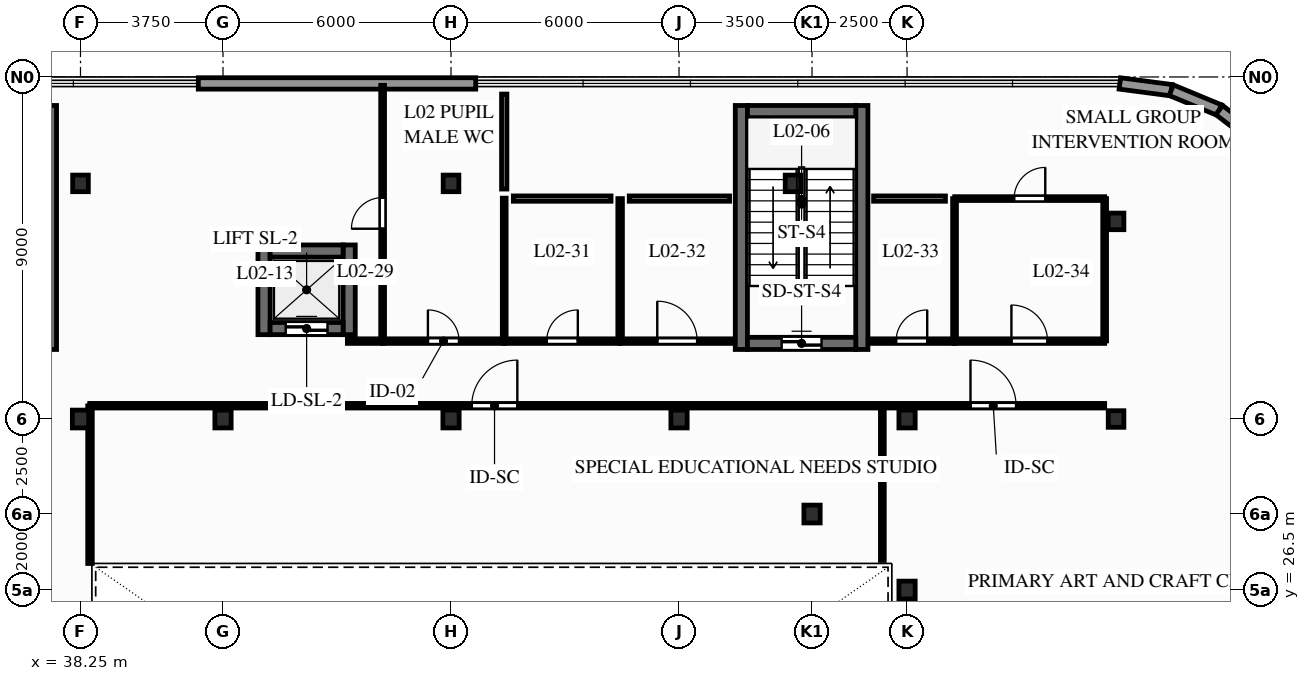
"""IFC4 building model, lengths in metres.
Left out: names, types, materials, properties, quantities, classifications, styles, units other than length and angle.
Written with IfcOpenShell. Run it as: python <this file> out.ifc"""

import sys

from ifc_helpers import new_model, si_unit, direction, frame, frame_2d, origin, origin_2d, place, context, subcontext, project, spatial, rectangle, i_section, extrude, element, fill, save


model = new_model("IFC4")
c1 = context("Model", 3, precision=1e-05, world=origin(), true_north=direction((0.0, 1.0)))
c2 = subcontext(c1, "Body", "Model", "MODEL_VIEW")
j1 = project(units=[si_unit("LENGTHUNIT", "METRE"), si_unit("PLANEANGLEUNIT", "RADIAN")], contexts=[c1])
p1 = place(None, origin())
s1 = spatial("IfcSite", under=j1, at=p1, CompositionType="ELEMENT")
p2 = place(p1, origin())
s2 = spatial("IfcBuilding", under=s1, at=p2, CompositionType="ELEMENT")
p3 = place(p2, frame((0.0, 0.0, 9.0)))
s3 = spatial("IfcBuildingStorey", under=s2, at=p3, CompositionType="ELEMENT", Elevation=9.0)
p4 = place(p3, frame((38.25, 31.0, 0.0), z_axis=(0.0, 0.0, 1.0), x_axis=(1.0, 0.0, 0.0)))
e1 = element("IfcColumn", 1, at=p4, inside=s3, PredefinedType="COLUMN", context=c2, shape_type="SweptSolid", body=[
    extrude(i_section(OverallWidth=0.428, OverallDepth=0.469, WebThickness=0.078, FlangeThickness=0.125, FilletRadius=0.015, at=origin_2d()), origin(), (0.0, 0.0, 1.0), 4.5),
])
p5 = place(p3, frame((38.25, 37.2, 0.0), z_axis=(0.0, 0.0, 1.0), x_axis=(1.0, 0.0, 0.0)))
e2 = element("IfcColumn", 2, at=p5, inside=s3, PredefinedType="COLUMN", context=c2, shape_type="SweptSolid", body=[
    extrude(i_section(OverallWidth=0.412, OverallDepth=0.437, WebThickness=0.036, FlangeThickness=0.058, FilletRadius=0.015, at=origin_2d()), origin(), (0.0, 0.0, 1.0), 4.5),
])
for number, where, z_axis, x_axis in (
    (3, (42.0, 31.0, 0.0), (0.0, 0.0, 1.0), (1.0, 0.0, 0.0)),
    (4, (48.0, 31.0, 0.0), (0.0, 0.0, 1.0), (1.0, 0.0, 0.0)),
):
    element("IfcColumn", number, at=place(p3, frame(where, z_axis=z_axis, x_axis=x_axis)), inside=s3, PredefinedType="COLUMN", context=c2, shape_type="SweptSolid", body=[
        extrude(i_section(OverallWidth=0.428, OverallDepth=0.469, WebThickness=0.078, FlangeThickness=0.125, FilletRadius=0.015, at=origin_2d()), origin(), (0.0, 0.0, 1.0), 4.5),
    ])
p6 = place(p3, frame((48.0, 37.2, 0.0), z_axis=(0.0, 0.0, 1.0), x_axis=(1.0, 0.0, 0.0)))
e5 = element("IfcColumn", 5, at=p6, inside=s3, PredefinedType="COLUMN", context=c2, shape_type="SweptSolid", body=[
    extrude(i_section(OverallWidth=0.412, OverallDepth=0.437, WebThickness=0.036, FlangeThickness=0.058, FilletRadius=0.015, at=origin_2d()), origin(), (0.0, 0.0, 1.0), 4.5),
])
p7 = place(p3, frame((54.0, 31.0, 0.0), z_axis=(0.0, 0.0, 1.0), x_axis=(1.0, 0.0, 0.0)))
e6 = element("IfcColumn", 6, at=p7, inside=s3, PredefinedType="COLUMN", context=c2, shape_type="SweptSolid", body=[
    extrude(i_section(OverallWidth=0.428, OverallDepth=0.469, WebThickness=0.078, FlangeThickness=0.125, FilletRadius=0.015, at=origin_2d()), origin(), (0.0, 0.0, 1.0), 4.5),
])
p8 = place(p3, frame((57.0, 37.2, 0.0), z_axis=(0.0, 0.0, 1.0), x_axis=(1.0, 0.0, 0.0)))
e7 = element("IfcColumn", 7, at=p8, inside=s3, PredefinedType="COLUMN", context=c2, shape_type="SweptSolid", body=[
    extrude(i_section(OverallWidth=0.412, OverallDepth=0.437, WebThickness=0.036, FlangeThickness=0.058, FilletRadius=0.015, at=origin_2d()), origin(), (0.0, 0.0, 1.0), 4.5),
])
for number, where, z_axis, x_axis in (
    (8, (57.5, 28.5, 0.0), (0.0, 0.0, 1.0), (1.0, 0.0, 0.0)),
    (9, (60.0, 26.5, 0.0), (0.0, 0.0, 1.0), (1.0, 0.0, 0.0)),
    (10, (60.0, 31.0, 0.0), (0.0, 0.0, 1.0), (1.0, 0.0, 0.0)),
):
    element("IfcColumn", number, at=place(p3, frame(where, z_axis=z_axis, x_axis=x_axis)), inside=s3, PredefinedType="COLUMN", context=c2, shape_type="SweptSolid", body=[
        extrude(i_section(OverallWidth=0.428, OverallDepth=0.469, WebThickness=0.078, FlangeThickness=0.125, FilletRadius=0.015, at=origin_2d()), origin(), (0.0, 0.0, 1.0), 4.5),
    ])
for number, where, z_axis, x_axis in (
    (11, (65.5, 31.0, 0.0), (0.0, 0.0, 1.0), (1.0, 0.0, 0.0)),
    (12, (65.5, 36.2, 0.0), (0.0, 0.0, 1.0), (1.0, 0.0, 0.0)),
):
    element("IfcColumn", number, at=place(p3, frame(where, z_axis=z_axis, x_axis=x_axis)), inside=s3, PredefinedType="COLUMN", context=c2, shape_type="SweptSolid", body=[
        extrude(i_section(OverallWidth=0.412, OverallDepth=0.437, WebThickness=0.036, FlangeThickness=0.058, FilletRadius=0.015, at=origin_2d()), origin(), (0.0, 0.0, 1.0), 4.5),
    ])
p9 = place(p3, frame((65.6, 39.83, 0.0), z_axis=(0.0, 0.0, 1.0), x_axis=(0.991442117533, -0.13054703207, 0.0)))
e13 = element("IfcWall", 13, at=p9, inside=s3, PredefinedType="STANDARD", context=c2, shape_type="SweptSolid", body=[
    extrude(rectangle(XDim=1.365, YDim=0.3, at=frame_2d((0.683, 0.0))), origin(), (0.0, 0.0, 1.0), 4.22),
])
p10 = place(p3, frame((66.954, 39.652, 0.0), z_axis=(0.0, 0.0, 1.0), x_axis=(0.923894797396, -0.382646577594, 0.0)))
e14 = element("IfcWall", 14, at=p10, inside=s3, PredefinedType="STANDARD", context=c2, shape_type="SweptSolid", body=[
    extrude(rectangle(XDim=1.365, YDim=0.3, at=frame_2d((0.683, 0.0))), origin(), (0.0, 0.0, 1.0), 4.22),
])
p11 = place(p3, frame((68.215, 39.129, 0.0), z_axis=(0.0, 0.0, 1.0), x_axis=(0.793255091989, -0.6088894473, 0.0)))
e15 = element("IfcWall", 15, at=p11, inside=s3, PredefinedType="STANDARD", context=c2, shape_type="SweptSolid", body=[
    extrude(rectangle(XDim=1.365, YDim=0.3, at=frame_2d((0.683, 0.0))), origin(), (0.0, 0.0, 1.0), 4.22),
])
p12 = place(p3, frame((41.35, 39.83, 0.0), z_axis=(0.0, 0.0, 1.0), x_axis=(1.0, 0.0, 0.0)))
e16 = element("IfcWall", 16, at=p12, inside=s3, PredefinedType="STANDARD", context=c2, shape_type="SweptSolid", body=[
    extrude(rectangle(XDim=7.3, YDim=0.3, at=frame_2d((3.65, 0.0))), origin(), (0.0, 0.0, 1.0), 4.22),
])
for number, where, z_axis, x_axis in (
    (17, (37.46, 32.83, 0.0), (0.0, 0.0, 1.0), (0.0, 1.0, 0.0)),
    (18, (55.64, 32.83, 0.0), (0.0, 0.0, 1.0), (0.0, 1.0, 0.0)),
    (19, (58.81, 32.83, 0.0), (0.0, 0.0, 1.0), (0.0, 1.0, 0.0)),
):
    element("IfcWall", number, at=place(p3, frame(where, z_axis=z_axis, x_axis=x_axis)), inside=s3, PredefinedType="SHEAR", context=c2, shape_type="SweptSolid", body=[
        extrude(rectangle(XDim=6.42, YDim=0.32, at=frame_2d((3.21, 0.0))), origin(), (0.0, 0.0, 1.0), 4.22),
    ])
p13 = place(p3, frame((55.8, 32.99, 0.0), z_axis=(0.0, 0.0, 1.0), x_axis=(1.0, 0.0, 0.0)))
e20 = element("IfcWall", 20, at=p13, inside=s3, PredefinedType="SHEAR", context=c2, shape_type="SweptSolid", body=[
    extrude(rectangle(XDim=2.85, YDim=0.32, at=frame_2d((1.425, 0.0))), origin(), (0.0, 0.0, 1.0), 4.22),
])
p14 = place(p13, frame((0.9, 0.0, 0.0)))
e21 = element("IfcOpeningElement", 21, at=p14, cuts=e20, PredefinedType="OPENING", context=c2, shape_type="SweptSolid", body=[
    extrude(rectangle(XDim=1.05, YDim=2.06, at=frame_2d((0.525, 1.03))), frame((0.0, 0.17, 0.0), z_axis=(0.0, -1.0, 0.0), x_axis=(1.0, 0.0, 0.0)), (0.0, 0.0, 1.0), 0.34),
])
p15 = place(p3, frame((58.65, 39.09, 0.0), z_axis=(0.0, 0.0, 1.0), x_axis=(-1.0, 0.0, 0.0)))
e22 = element("IfcWall", 22, at=p15, inside=s3, PredefinedType="SHEAR", context=c2, shape_type="SweptSolid", body=[
    extrude(rectangle(XDim=2.85, YDim=0.32, at=frame_2d((1.425, 0.0))), origin(), (0.0, 0.0, 1.0), 4.22),
])
for number, where, z_axis, x_axis in (
    (23, (43.08, 33.22, 0.0), (0.0, 0.0, 1.0), (0.0, 1.0, 0.0)),
    (24, (45.32, 33.22, 0.0), (0.0, 0.0, 1.0), (0.0, 1.0, 0.0)),
):
    element("IfcWall", number, at=place(p3, frame(where, z_axis=z_axis, x_axis=x_axis)), inside=s3, PredefinedType="SHEAR", context=c2, shape_type="SweptSolid", body=[
        extrude(rectangle(XDim=2.36, YDim=0.32, at=frame_2d((1.18, 0.0))), origin(), (0.0, 0.0, 1.0), 4.22),
    ])
p16 = place(p3, frame((43.24, 33.38, 0.0), z_axis=(0.0, 0.0, 1.0), x_axis=(1.0, 0.0, 0.0)))
e25 = element("IfcWall", 25, at=p16, inside=s3, PredefinedType="SHEAR", context=c2, shape_type="SweptSolid", body=[
    extrude(rectangle(XDim=1.92, YDim=0.32, at=frame_2d((0.96, 0.0))), origin(), (0.0, 0.0, 1.0), 4.22),
])
p17 = place(p16, frame((0.41, 0.0, 0.0)))
e26 = element("IfcOpeningElement", 26, at=p17, cuts=e25, PredefinedType="OPENING", context=c2, shape_type="SweptSolid", body=[
    extrude(rectangle(XDim=1.1, YDim=2.06, at=frame_2d((0.55, 1.03))), frame((0.0, 0.17, 0.0), z_axis=(0.0, -1.0, 0.0), x_axis=(1.0, 0.0, 0.0)), (0.0, 0.0, 1.0), 0.34),
])
p18 = place(p3, frame((43.24, 35.42, 0.0), z_axis=(0.0, 0.0, 1.0), x_axis=(1.0, 0.0, 0.0)))
e27 = element("IfcWall", 27, at=p18, inside=s3, PredefinedType="SHEAR", context=c2, shape_type="SweptSolid", body=[
    extrude(rectangle(XDim=1.92, YDim=0.32, at=frame_2d((0.96, 0.0))), origin(), (0.0, 0.0, 1.0), 4.22),
])
p19 = place(p3, frame((45.273, 33.05, 0.0), z_axis=(0.0, 0.0, 1.0), x_axis=(1.0, 0.0, 0.0)))
e28 = element("IfcWall", 28, at=p19, inside=s3, PredefinedType="PARTITIONING", context=c2, shape_type="SweptSolid", body=[
    extrude(rectangle(XDim=0.938, YDim=0.12, at=frame_2d((0.469, 0.0))), origin(), (0.0, 0.0, 1.0), 4.22),
])
p20 = place(p3, frame((46.193, 33.05, 0.0), z_axis=(0.0, 0.0, 1.0), x_axis=(1.0, 0.0, 0.0)))
e29 = element("IfcWall", 29, at=p20, inside=s3, PredefinedType="PARTITIONING", context=c2, shape_type="SweptSolid", body=[
    extrude(rectangle(XDim=3.219, YDim=0.12, at=frame_2d((1.609, 0.0))), origin(), (0.0, 0.0, 1.0), 3.344),
])
p21 = place(p20, frame((1.199, 0.0, 0.0)))
e30 = element("IfcOpeningElement", 30, at=p21, cuts=e29, PredefinedType="OPENING", context=c2, shape_type="SweptSolid", body=[
    extrude(rectangle(XDim=0.82, YDim=2.02, at=frame_2d((0.41, 1.01))), frame((0.0, 0.07, 0.0), z_axis=(0.0, -1.0, 0.0), x_axis=(1.0, 0.0, 0.0)), (0.0, 0.0, 1.0), 0.14),
])
p22 = place(p3, frame((49.393, 33.05, 0.0), z_axis=(0.0, 0.0, 1.0), x_axis=(1.0, 0.0, 0.0)))
e31 = element("IfcWall", 31, at=p22, inside=s3, PredefinedType="PARTITIONING", context=c2, shape_type="SweptSolid", body=[
    extrude(rectangle(XDim=3.069, YDim=0.12, at=frame_2d((1.534, 0.0))), origin(), (0.0, 0.0, 1.0), 4.22),
])
p23 = place(p22, frame((1.124, 0.0, 0.0)))
e32 = element("IfcOpeningElement", 32, at=p23, cuts=e31, PredefinedType="OPENING", context=c2, shape_type="SweptSolid", body=[
    extrude(rectangle(XDim=0.82, YDim=2.02, at=frame_2d((0.41, 1.01))), frame((0.0, 0.07, 0.0), z_axis=(0.0, -1.0, 0.0), x_axis=(1.0, 0.0, 0.0)), (0.0, 0.0, 1.0), 0.14),
])
p24 = place(p3, frame((52.443, 33.05, 0.0), z_axis=(0.0, 0.0, 1.0), x_axis=(1.0, 0.0, 0.0)))
e33 = element("IfcWall", 33, at=p24, inside=s3, PredefinedType="PARTITIONING", context=c2, shape_type="SweptSolid", body=[
    extrude(rectangle(XDim=3.019, YDim=0.12, at=frame_2d((1.509, 0.0))), origin(), (0.0, 0.0, 1.0), 4.22),
])
p25 = place(p24, frame((0.984, 0.0, 0.0)))
e34 = element("IfcOpeningElement", 34, at=p25, cuts=e33, PredefinedType="OPENING", context=c2, shape_type="SweptSolid", body=[
    extrude(rectangle(XDim=1.05, YDim=2.06, at=frame_2d((0.525, 1.03))), frame((0.0, 0.07, 0.0), z_axis=(0.0, -1.0, 0.0), x_axis=(1.0, 0.0, 0.0)), (0.0, 0.0, 1.0), 0.14),
])
p26 = place(p3, frame((58.98, 33.05, 0.0), z_axis=(0.0, 0.0, 1.0), x_axis=(1.0, 0.0, 0.0)))
e35 = element("IfcWall", 35, at=p26, inside=s3, PredefinedType="PARTITIONING", context=c2, shape_type="SweptSolid", body=[
    extrude(rectangle(XDim=2.281, YDim=0.12, at=frame_2d((1.141, 0.0))), origin(), (0.0, 0.0, 1.0), 4.22),
])
p27 = place(p26, frame((0.731, 0.0, 0.0)))
e36 = element("IfcOpeningElement", 36, at=p27, cuts=e35, PredefinedType="OPENING", context=c2, shape_type="SweptSolid", body=[
    extrude(rectangle(XDim=0.82, YDim=2.02, at=frame_2d((0.41, 1.01))), frame((0.0, 0.07, 0.0), z_axis=(0.0, -1.0, 0.0), x_axis=(1.0, 0.0, 0.0)), (0.0, 0.0, 1.0), 0.14),
])
p28 = place(p3, frame((61.243, 33.05, 0.0), z_axis=(0.0, 0.0, 1.0), x_axis=(1.0, 0.0, 0.0)))
e37 = element("IfcWall", 37, at=p28, inside=s3, PredefinedType="PARTITIONING", context=c2, shape_type="SweptSolid", body=[
    extrude(rectangle(XDim=3.957, YDim=0.12, at=frame_2d((1.979, 0.0))), origin(), (0.0, 0.0, 1.0), 4.22),
])
p29 = place(p28, frame((1.504, 0.0, 0.0)))
e38 = element("IfcOpeningElement", 38, at=p29, cuts=e37, PredefinedType="OPENING", context=c2, shape_type="SweptSolid", body=[
    extrude(rectangle(XDim=0.95, YDim=2.05, at=frame_2d((0.475, 1.025))), frame((0.0, 0.07, 0.0), z_axis=(0.0, -1.0, 0.0), x_axis=(1.0, 0.0, 0.0)), (0.0, 0.0, 1.0), 0.14),
])
p30 = place(p3, frame((59.339, 31.35, 0.0), z_axis=(0.0, 0.0, 1.0), x_axis=(1.0, 0.0, 0.0)))
e39 = element("IfcWall", 39, at=p30, inside=s3, PredefinedType="PARTITIONING", context=c2, shape_type="SweptSolid", body=[
    extrude(rectangle(XDim=5.861, YDim=0.12, at=frame_2d((2.931, 0.0))), origin(), (0.0, 0.0, 1.0), 4.22),
])
p31 = place(p30, frame((2.331, 0.0, 0.0)))
e40 = element("IfcOpeningElement", 40, at=p31, cuts=e39, PredefinedType="OPENING", context=c2, shape_type="SweptSolid", body=[
    extrude(rectangle(XDim=1.2, YDim=2.08, at=frame_2d((0.6, 1.04))), frame((0.0, 0.07, 0.0), z_axis=(0.0, -1.0, 0.0), x_axis=(1.0, 0.0, 0.0)), (0.0, 0.0, 1.0), 0.14),
])
p32 = place(p3, frame((38.493, 31.35, 0.0), z_axis=(0.0, 0.0, 1.0), x_axis=(1.0, 0.0, 0.0)))
e41 = element("IfcWall", 41, at=p32, inside=s3, PredefinedType="PARTITIONING", context=c2, shape_type="SweptSolid", body=[
    extrude(rectangle(XDim=20.865, YDim=0.12, at=frame_2d((10.432, 0.0))), origin(), (0.0, 0.0, 1.0), 3.344),
])
p33 = place(p32, frame((10.052, 0.0, 0.0)))
e42 = element("IfcOpeningElement", 42, at=p33, cuts=e41, PredefinedType="OPENING", context=c2, shape_type="SweptSolid", body=[
    extrude(rectangle(XDim=1.2, YDim=2.08, at=frame_2d((0.6, 1.04))), frame((0.0, 0.07, 0.0), z_axis=(0.0, -1.0, 0.0), x_axis=(1.0, 0.0, 0.0)), (0.0, 0.0, 1.0), 0.14),
])
p34 = place(p3, frame((38.5, 27.199, 0.0), z_axis=(0.0, 0.0, 1.0), x_axis=(0.0, 1.0, 0.0)))
e43 = element("IfcWall", 43, at=p34, inside=s3, PredefinedType="PARTITIONING", context=c2, shape_type="SweptSolid", body=[
    extrude(rectangle(XDim=4.146, YDim=0.12, at=frame_2d((2.073, 0.0))), origin(), (0.0, 0.0, 1.0), 3.344),
])
p35 = place(p3, frame((46.2, 33.054, 0.0), z_axis=(0.0, 0.0, 1.0), x_axis=(0.0, 1.0, 0.0)))
e44 = element("IfcWall", 44, at=p35, inside=s3, PredefinedType="PARTITIONING", context=c2, shape_type="SweptSolid", body=[
    extrude(rectangle(XDim=6.726, YDim=0.1, at=frame_2d((3.363, 0.0))), origin(), (0.0, 0.0, 1.0), 3.583),
])
p36 = place(p35, frame((2.953, 0.0, 0.0)))
e45 = element("IfcOpeningElement", 45, at=p36, cuts=e44, PredefinedType="OPENING", context=c2, shape_type="SweptSolid", body=[
    extrude(rectangle(XDim=0.82, YDim=2.02, at=frame_2d((0.41, 1.01))), frame((0.0, 0.06, 0.0), z_axis=(0.0, -1.0, 0.0), x_axis=(1.0, 0.0, 0.0)), (0.0, 0.0, 1.0), 0.12),
])
p37 = place(p3, frame((49.4, 33.054, 0.0), z_axis=(0.0, 0.0, 1.0), x_axis=(0.0, 1.0, 0.0)))
e46 = element("IfcWall", 46, at=p37, inside=s3, PredefinedType="PARTITIONING", context=c2, shape_type="SweptSolid", body=[
    extrude(rectangle(XDim=3.757, YDim=0.1, at=frame_2d((1.879, 0.0))), origin(), (0.0, 0.0, 1.0), 4.22),
])
p38 = place(p3, frame((52.45, 33.054, 0.0), z_axis=(0.0, 0.0, 1.0), x_axis=(0.0, 1.0, 0.0)))
e47 = element("IfcWall", 47, at=p38, inside=s3, PredefinedType="PARTITIONING", context=c2, shape_type="SweptSolid", body=[
    extrude(rectangle(XDim=3.746, YDim=0.12, at=frame_2d((1.873, 0.0))), origin(), (0.0, 0.0, 1.0), 4.22),
])
for number, where, z_axis, x_axis in (
    (48, (61.25, 33.054, 0.0), (0.0, 0.0, 1.0), (0.0, 1.0, 0.0)),
    (49, (65.2, 33.054, 0.0), (0.0, 0.0, 1.0), (0.0, 1.0, 0.0)),
):
    element("IfcWall", number, at=place(p3, frame(where, z_axis=z_axis, x_axis=x_axis)), inside=s3, PredefinedType="PARTITIONING", context=c2, shape_type="SweptSolid", body=[
        extrude(rectangle(XDim=3.746, YDim=0.1, at=frame_2d((1.873, 0.0))), origin(), (0.0, 0.0, 1.0), 4.22),
    ])
p39 = place(p3, frame((61.254, 36.8, 0.0), z_axis=(0.0, 0.0, 1.0), x_axis=(1.0, 0.0, 0.0)))
e50 = element("IfcWall", 50, at=p39, inside=s3, PredefinedType="PARTITIONING", context=c2, shape_type="SweptSolid", body=[
    extrude(rectangle(XDim=3.946, YDim=0.1, at=frame_2d((1.973, 0.0))), origin(), (0.0, 0.0, 1.0), 4.22),
])
p40 = place(p39, frame((1.563, 0.0, 0.0)))
e51 = element("IfcOpeningElement", 51, at=p40, cuts=e50, PredefinedType="OPENING", context=c2, shape_type="SweptSolid", body=[
    extrude(rectangle(XDim=0.82, YDim=2.02, at=frame_2d((0.41, 1.01))), frame((0.0, 0.06, 0.0), z_axis=(0.0, -1.0, 0.0), x_axis=(1.0, 0.0, 0.0)), (0.0, 0.0, 1.0), 0.12),
])
p41 = place(p3, frame((59.35, 27.28, 0.0), z_axis=(0.0, 0.0, 1.0), x_axis=(0.0, 1.0, 0.0)))
e52 = element("IfcWall", 52, at=p41, inside=s3, PredefinedType="PARTITIONING", context=c2, shape_type="SweptSolid", body=[
    extrude(rectangle(XDim=4.066, YDim=0.1, at=frame_2d((2.033, 0.0))), origin(), (0.0, 0.0, 1.0), 3.583),
])
p42 = place(p3, frame((49.4, 37.051, 0.0), z_axis=(0.0, 0.0, 1.0), x_axis=(0.0, 1.0, 0.0)))
e53 = element("IfcWall", 53, at=p42, inside=s3, PredefinedType="PARTITIONING", context=c2, shape_type="SweptSolid", body=[
    extrude(rectangle(XDim=2.499, YDim=0.14, at=frame_2d((1.25, 0.0))), origin(), (0.0, 0.0, 1.0), 4.22),
])
p43 = place(p3, frame((49.64, 36.8, 0.0), z_axis=(0.0, 0.0, 1.0), x_axis=(1.0, 0.0, 0.0)))
e54 = element("IfcWall", 54, at=p43, inside=s3, PredefinedType="PARTITIONING", context=c2, shape_type="SweptSolid", body=[
    extrude(rectangle(XDim=2.57, YDim=0.14, at=frame_2d((1.285, 0.0))), origin(), (0.0, 0.0, 1.0), 4.22),
])
p44 = place(p3, frame((52.69, 36.8, 0.0), z_axis=(0.0, 0.0, 1.0), x_axis=(1.0, 0.0, 0.0)))
e55 = element("IfcWall", 55, at=p44, inside=s3, PredefinedType="PARTITIONING", context=c2, shape_type="SweptSolid", body=[
    extrude(rectangle(XDim=2.64, YDim=0.14, at=frame_2d((1.32, 0.0))), origin(), (0.0, 0.0, 1.0), 4.22),
])
p45 = place(p3, frame((59.12, 36.8, 0.0), z_axis=(0.0, 0.0, 1.0), x_axis=(1.0, 0.0, 0.0)))
e56 = element("IfcWall", 56, at=p45, inside=s3, PredefinedType="PARTITIONING", context=c2, shape_type="SweptSolid", body=[
    extrude(rectangle(XDim=1.89, YDim=0.14, at=frame_2d((0.945, 0.0))), origin(), (0.0, 0.0, 1.0), 4.22),
])
p46 = place(p14, origin())
e57 = element("IfcDoor", 57, at=p46, inside=s3, OperationType="SINGLE_SWING_LEFT", PredefinedType="DOOR", context=c2, shape_type="SweptSolid", body=[
    extrude(rectangle(XDim=1.05, YDim=2.06, at=frame_2d((0.525, 1.03))), frame((0.0, 0.025, 0.0), z_axis=(0.0, -1.0, 0.0), x_axis=(1.0, 0.0, 0.0)), (0.0, 0.0, 1.0), 0.05),
])
fill(e21, e57)
p47 = place(p17, origin())
e58 = element("IfcDoor", 58, at=p47, inside=s3, OperationType="SLIDING_TO_LEFT", PredefinedType="DOOR", context=c2, shape_type="SweptSolid", body=[
    extrude(rectangle(XDim=1.1, YDim=2.06, at=frame_2d((0.55, 1.03))), frame((0.0, 0.025, 0.0), z_axis=(0.0, -1.0, 0.0), x_axis=(1.0, 0.0, 0.0)), (0.0, 0.0, 1.0), 0.05),
])
fill(e26, e58)
p48 = place(p21, origin())
e59 = element("IfcDoor", 59, at=p48, inside=s3, OperationType="SINGLE_SWING_LEFT", PredefinedType="DOOR", context=c2, shape_type="SweptSolid", body=[
    extrude(rectangle(XDim=0.82, YDim=2.02, at=frame_2d((0.41, 1.01))), frame((0.0, 0.025, 0.0), z_axis=(0.0, -1.0, 0.0), x_axis=(1.0, 0.0, 0.0)), (0.0, 0.0, 1.0), 0.05),
])
fill(e30, e59)
p49 = place(p23, origin())
e60 = element("IfcDoor", 60, at=p49, inside=s3, OperationType="SINGLE_SWING_RIGHT", PredefinedType="DOOR", context=c2, shape_type="SweptSolid", body=[
    extrude(rectangle(XDim=0.82, YDim=2.02, at=frame_2d((0.41, 1.01))), frame((0.0, 0.025, 0.0), z_axis=(0.0, -1.0, 0.0), x_axis=(1.0, 0.0, 0.0)), (0.0, 0.0, 1.0), 0.05),
])
fill(e32, e60)
p50 = place(p25, origin())
e61 = element("IfcDoor", 61, at=p50, inside=s3, OperationType="SINGLE_SWING_LEFT", PredefinedType="DOOR", context=c2, shape_type="SweptSolid", body=[
    extrude(rectangle(XDim=1.05, YDim=2.06, at=frame_2d((0.525, 1.03))), frame((0.0, 0.025, 0.0), z_axis=(0.0, -1.0, 0.0), x_axis=(1.0, 0.0, 0.0)), (0.0, 0.0, 1.0), 0.05),
])
fill(e34, e61)
p51 = place(p27, origin())
e62 = element("IfcDoor", 62, at=p51, inside=s3, OperationType="SINGLE_SWING_RIGHT", PredefinedType="DOOR", context=c2, shape_type="SweptSolid", body=[
    extrude(rectangle(XDim=0.82, YDim=2.02, at=frame_2d((0.41, 1.01))), frame((0.0, 0.025, 0.0), z_axis=(0.0, -1.0, 0.0), x_axis=(1.0, 0.0, 0.0)), (0.0, 0.0, 1.0), 0.05),
])
fill(e36, e62)
p52 = place(p29, origin())
e63 = element("IfcDoor", 63, at=p52, inside=s3, OperationType="SINGLE_SWING_LEFT", PredefinedType="DOOR", context=c2, shape_type="SweptSolid", body=[
    extrude(rectangle(XDim=0.95, YDim=2.05, at=frame_2d((0.475, 1.025))), frame((0.0, 0.025, 0.0), z_axis=(0.0, -1.0, 0.0), x_axis=(1.0, 0.0, 0.0)), (0.0, 0.0, 1.0), 0.05),
])
fill(e38, e63)
p53 = place(p31, origin())
e64 = element("IfcDoor", 64, at=p53, inside=s3, OperationType="SINGLE_SWING_LEFT", PredefinedType="DOOR", context=c2, shape_type="SweptSolid", body=[
    extrude(rectangle(XDim=1.2, YDim=2.08, at=frame_2d((0.6, 1.04))), frame((0.0, 0.025, 0.0), z_axis=(0.0, -1.0, 0.0), x_axis=(1.0, 0.0, 0.0)), (0.0, 0.0, 1.0), 0.05),
])
fill(e40, e64)
p54 = place(p33, origin())
e65 = element("IfcDoor", 65, at=p54, inside=s3, OperationType="SINGLE_SWING_RIGHT", PredefinedType="DOOR", context=c2, shape_type="SweptSolid", body=[
    extrude(rectangle(XDim=1.2, YDim=2.08, at=frame_2d((0.6, 1.04))), frame((0.0, 0.025, 0.0), z_axis=(0.0, -1.0, 0.0), x_axis=(1.0, 0.0, 0.0)), (0.0, 0.0, 1.0), 0.05),
])
fill(e42, e65)
p55 = place(p36, origin())
e66 = element("IfcDoor", 66, at=p55, inside=s3, OperationType="SINGLE_SWING_LEFT", PredefinedType="DOOR", context=c2, shape_type="SweptSolid", body=[
    extrude(rectangle(XDim=0.82, YDim=2.02, at=frame_2d((0.41, 1.01))), frame((0.0, 0.025, 0.0), z_axis=(0.0, -1.0, 0.0), x_axis=(1.0, 0.0, 0.0)), (0.0, 0.0, 1.0), 0.05),
])
fill(e45, e66)
p56 = place(p40, origin())
e67 = element("IfcDoor", 67, at=p56, inside=s3, OperationType="SINGLE_SWING_RIGHT", PredefinedType="DOOR", context=c2, shape_type="SweptSolid", body=[
    extrude(rectangle(XDim=0.82, YDim=2.02, at=frame_2d((0.41, 1.01))), frame((0.0, 0.025, 0.0), z_axis=(0.0, -1.0, 0.0), x_axis=(1.0, 0.0, 0.0)), (0.0, 0.0, 1.0), 0.05),
])
fill(e51, e67)
save(model, sys.argv[1])
